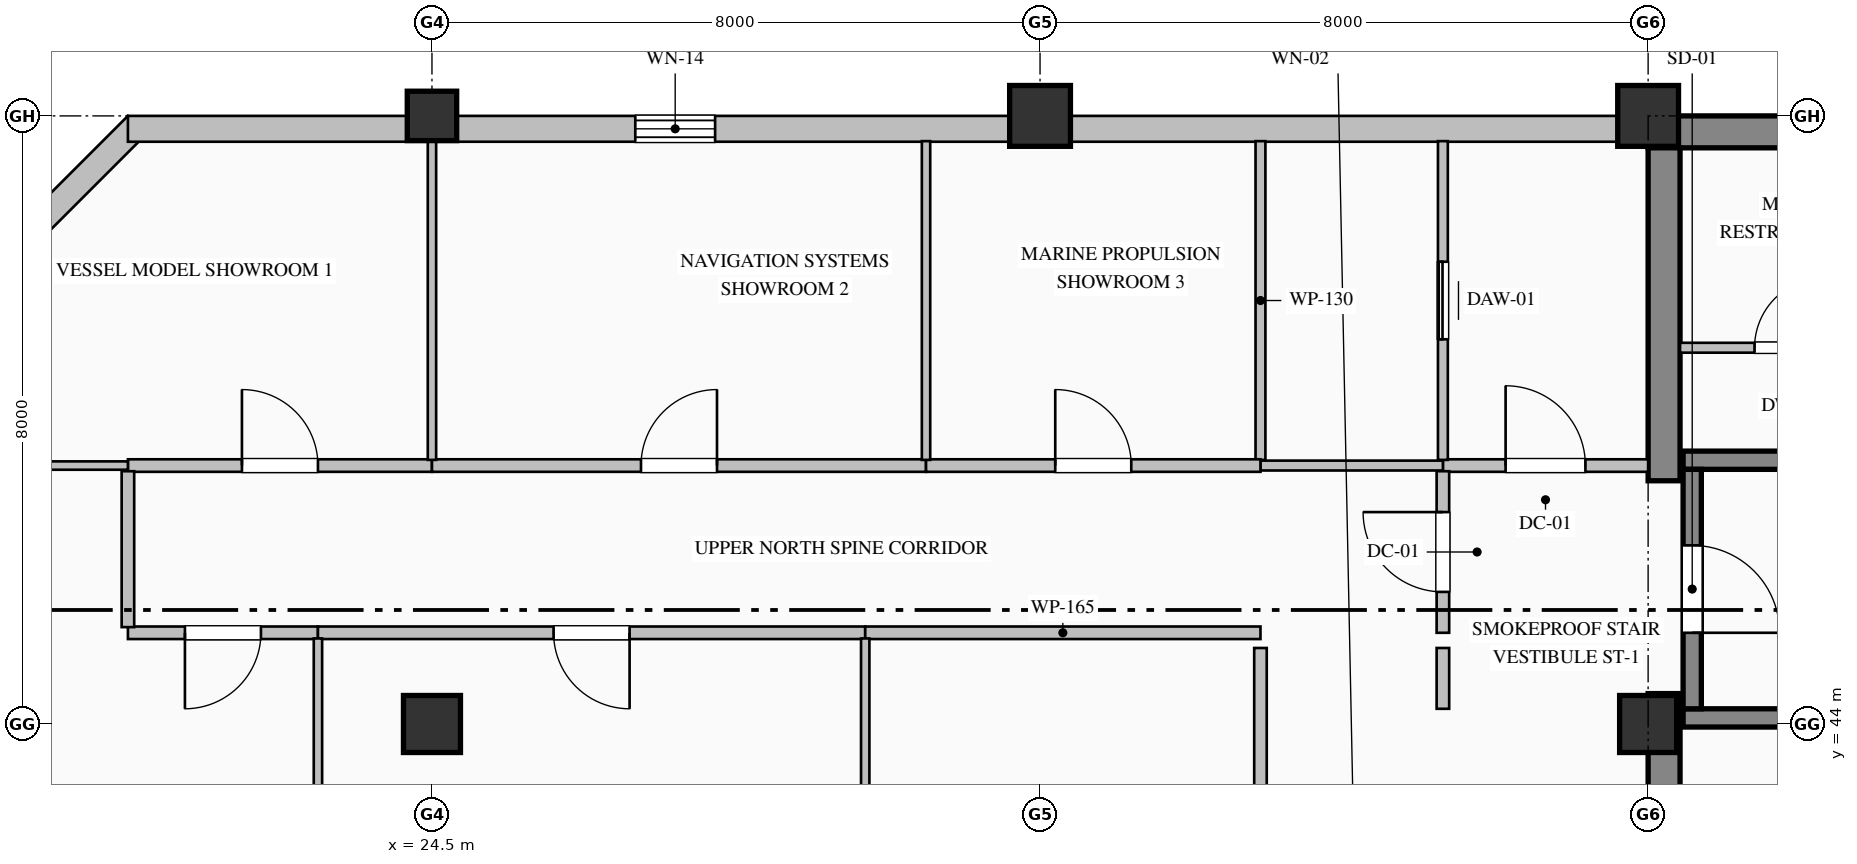
"""IFC4 building model, lengths in metres.
Left out: names, types, materials, properties, quantities, classifications, styles, units other than length and angle.
Written with IfcOpenShell. Run it as: python <this file> out.ifc"""

import sys

from ifc_helpers import new_model, si_unit, direction, frame, frame_2d, origin, origin_2d, place, context, subcontext, project, spatial, rectangle, hollow_rectangle, extrude, element, fill, save


model = new_model("IFC4")
c1 = context("Model", 3, precision=1e-05, world=origin(), true_north=direction((0.0, 1.0)))
c2 = subcontext(c1, "Body", "Model", "MODEL_VIEW")
j1 = project(units=[si_unit("LENGTHUNIT", "METRE"), si_unit("PLANEANGLEUNIT", "RADIAN")], contexts=[c1])
p1 = place(None, origin())
s1 = spatial("IfcSite", under=j1, at=p1, CompositionType="ELEMENT")
p2 = place(p1, origin())
s2 = spatial("IfcBuilding", under=s1, at=p2, CompositionType="ELEMENT")
p3 = place(p2, frame((0.0, 0.0, 351.2)))
s3 = spatial("IfcBuildingStorey", under=s2, at=p3, CompositionType="ELEMENT", Elevation=351.2)
p4 = place(p3, frame((40.5, 51.79, 0.0), z_axis=(0.0, 0.0, 1.0), x_axis=(1.0, 0.0, 0.0)))
e1 = element("IfcWall", 1, at=p4, inside=s3, PredefinedType="SHEAR", context=c2, shape_type="SweptSolid", body=[
    extrude(rectangle(XDim=23.5, YDim=0.42, at=frame_2d((11.75, 0.0))), origin(), (0.0, 0.0, 1.0), 3.785),
])
p5 = place(p3, frame((40.71, 36.42, 0.0), z_axis=(0.0, 0.0, 1.0), x_axis=(0.0, 1.0, 0.0)))
e2 = element("IfcWall", 2, at=p5, inside=s3, PredefinedType="SHEAR", context=c2, shape_type="SweptSolid", body=[
    extrude(rectangle(XDim=7.98, YDim=0.42, at=frame_2d((3.99, 0.0))), origin(), (0.0, 0.0, 1.0), 3.785),
])
p6 = place(p3, frame((40.71, 47.2, 0.0), z_axis=(0.0, 0.0, 1.0), x_axis=(0.0, 1.0, 0.0)))
e3 = element("IfcWall", 3, at=p6, inside=s3, PredefinedType="SHEAR", context=c2, shape_type="SweptSolid", body=[
    extrude(rectangle(XDim=4.38, YDim=0.42, at=frame_2d((2.19, 0.0))), origin(), (0.0, 0.0, 1.0), 3.785),
])
p7 = place(p3, frame((24.5, 44.0, 0.0), z_axis=(0.0, 0.0, 1.0), x_axis=(1.0, 0.0, 0.0)))
e4 = element("IfcColumn", 4, at=p7, inside=s3, PredefinedType="COLUMN", context=c2, shape_type="SweptSolid", body=[
    extrude(rectangle(XDim=0.75, YDim=0.75, at=origin_2d()), origin(), (0.0, 0.0, 1.0), 4.0),
])
p8 = place(p3, frame((24.5, 52.0, 0.0), z_axis=(0.0, 0.0, 1.0), x_axis=(1.0, 0.0, 0.0)))
e5 = element("IfcColumn", 5, at=p8, inside=s3, PredefinedType="COLUMN", context=c2, shape_type="SweptSolid", body=[
    extrude(hollow_rectangle(XDim=0.65, YDim=0.65, WallThickness=0.028, at=origin_2d()), origin(), (0.0, 0.0, 1.0), 4.0),
])
p9 = place(p3, frame((32.5, 52.0, 0.0), z_axis=(0.0, 0.0, 1.0), x_axis=(1.0, 0.0, 0.0)))
e6 = element("IfcColumn", 6, at=p9, inside=s3, PredefinedType="COLUMN", context=c2, shape_type="SweptSolid", body=[
    extrude(hollow_rectangle(XDim=0.8, YDim=0.8, WallThickness=0.032, at=origin_2d()), origin(), (0.0, 0.0, 1.0), 4.0),
])
p10 = place(p3, frame((40.5, 44.0, 0.0), z_axis=(0.0, 0.0, 1.0), x_axis=(1.0, 0.0, 0.0)))
e7 = element("IfcColumn", 7, at=p10, inside=s3, PredefinedType="COLUMN", context=c2, shape_type="SweptSolid", body=[
    extrude(rectangle(XDim=0.75, YDim=0.75, at=origin_2d()), origin(), (0.0, 0.0, 1.0), 4.0),
])
p11 = place(p3, frame((40.5, 52.0, 0.0), z_axis=(0.0, 0.0, 1.0), x_axis=(1.0, 0.0, 0.0)))
e8 = element("IfcColumn", 8, at=p11, inside=s3, PredefinedType="COLUMN", context=c2, shape_type="SweptSolid", body=[
    extrude(hollow_rectangle(XDim=0.8, YDim=0.8, WallThickness=0.032, at=origin_2d()), origin(), (0.0, 0.0, 1.0), 4.0),
])
p12 = place(p3, frame((16.62, 47.88, 0.0), z_axis=(0.0, 0.0, 1.0), x_axis=(0.707106781187, 0.707106781187, 0.0)))
e9 = element("IfcWall", 9, at=p12, inside=s3, PredefinedType="SOLIDWALL", context=c2, shape_type="SweptSolid", body=[
    extrude(rectangle(XDim=5.657, YDim=0.34, at=frame_2d((2.828, 0.0))), origin(), (0.0, 0.0, 1.0), 3.785),
])
p13 = place(p3, frame((20.5, 51.83, 0.0), z_axis=(0.0, 0.0, 1.0), x_axis=(1.0, 0.0, 0.0)))
e10 = element("IfcWall", 10, at=p13, inside=s3, PredefinedType="SOLIDWALL", context=c2, shape_type="SweptSolid", body=[
    extrude(rectangle(XDim=20.02, YDim=0.34, at=frame_2d((10.01, 0.0))), origin(), (0.0, 0.0, 1.0), 3.335),
])
p14 = place(p13, frame((6.675, 0.0, 0.8)))
e11 = element("IfcOpeningElement", 11, at=p14, cuts=e10, PredefinedType="OPENING", context=c2, shape_type="SweptSolid", body=[
    extrude(rectangle(XDim=1.05, YDim=2.15, at=frame_2d((0.525, 1.075))), frame((0.0, 0.18, 0.0), z_axis=(0.0, -1.0, 0.0), x_axis=(1.0, 0.0, 0.0)), (0.0, 0.0, 1.0), 0.36),
])
for number, where, z_axis, x_axis in (
    (12, (40.96, 47.47, 0.0), (0.0, 0.0, 1.0), (1.0, 0.0, 0.0)),
    (13, (49.04, 44.08, 0.0), (0.0, 0.0, 1.0), (-1.0, 0.0, 0.0)),
):
    element("IfcWall", number, at=place(p3, frame(where, z_axis=z_axis, x_axis=x_axis)), inside=s3, PredefinedType="SOLIDWALL", context=c2, shape_type="SweptSolid", body=[
        extrude(rectangle(XDim=8.08, YDim=0.24, at=frame_2d((4.04, 0.0))), origin(), (0.0, 0.0, 1.0), 4.0),
    ])
p15 = place(p3, frame((41.08, 47.35, 0.0), z_axis=(0.0, 0.0, 1.0), x_axis=(0.0, -1.0, 0.0)))
e14 = element("IfcWall", 14, at=p15, inside=s3, PredefinedType="SOLIDWALL", context=c2, shape_type="SweptSolid", body=[
    extrude(rectangle(XDim=3.15, YDim=0.24, at=frame_2d((1.575, 0.0))), origin(), (0.0, 0.0, 1.0), 4.0),
])
p16 = place(p15, frame((1.0, 0.0, 0.0)))
e15 = element("IfcOpeningElement", 15, at=p16, cuts=e14, PredefinedType="OPENING", context=c2, shape_type="SweptSolid", body=[
    extrude(rectangle(XDim=1.15, YDim=2.2, at=frame_2d((0.575, 1.1))), frame((0.0, 0.13, 0.0), z_axis=(0.0, -1.0, 0.0), x_axis=(1.0, 0.0, 0.0)), (0.0, 0.0, 1.0), 0.26),
])
p17 = place(p3, frame((37.8, 47.4, 0.0), z_axis=(0.0, 0.0, 1.0), x_axis=(1.0, 0.0, 0.0)))
e16 = element("IfcWall", 16, at=p17, inside=s3, PredefinedType="PARTITIONING", context=c2, shape_type="SweptSolid", body=[
    extrude(rectangle(XDim=2.7, YDim=0.165, at=frame_2d((1.35, 0.0))), origin(), (0.0, 0.0, 1.0), 3.785),
])
p18 = place(p17, frame((0.825, 0.0, 0.0)))
e17 = element("IfcOpeningElement", 17, at=p18, cuts=e16, PredefinedType="OPENING", context=c2, shape_type="SweptSolid", body=[
    extrude(rectangle(XDim=1.05, YDim=2.15, at=frame_2d((0.525, 1.075))), frame((0.0, 0.093, 0.0), z_axis=(0.0, -1.0, 0.0), x_axis=(1.0, 0.0, 0.0)), (0.0, 0.0, 1.0), 0.185),
])
p19 = place(p3, frame((37.8, 45.2, 0.0), z_axis=(0.0, 0.0, 1.0), x_axis=(0.0, 1.0, 0.0)))
e18 = element("IfcWall", 18, at=p19, inside=s3, PredefinedType="PARTITIONING", context=c2, shape_type="SweptSolid", body=[
    extrude(rectangle(XDim=2.125, YDim=0.165, at=frame_2d((1.063, 0.0))), origin(), (0.0, 0.0, 1.0), 3.785),
])
p20 = place(p19, frame((0.538, 0.0, 0.0)))
e19 = element("IfcOpeningElement", 19, at=p20, cuts=e18, PredefinedType="OPENING", context=c2, shape_type="SweptSolid", body=[
    extrude(rectangle(XDim=1.05, YDim=2.15, at=frame_2d((0.525, 1.075))), frame((0.0, 0.093, 0.0), z_axis=(0.0, -1.0, 0.0), x_axis=(1.0, 0.0, 0.0)), (0.0, 0.0, 1.0), 0.185),
])
p21 = place(p3, frame((37.8, 44.2, 0.0), z_axis=(0.0, 0.0, 1.0), x_axis=(0.0, 1.0, 0.0)))
e20 = element("IfcWall", 20, at=p21, inside=s3, PredefinedType="PARTITIONING", context=c2, shape_type="SweptSolid", body=[
    extrude(rectangle(XDim=0.8, YDim=0.165, at=frame_2d((0.4, 0.0))), origin(), (0.0, 0.0, 1.0), 3.785),
])
p22 = place(p3, frame((37.8, 47.475, 0.0), z_axis=(0.0, 0.0, 1.0), x_axis=(0.0, 1.0, 0.0)))
e21 = element("IfcWall", 21, at=p22, inside=s3, PredefinedType="PARTITIONING", context=c2, shape_type="SweptSolid", body=[
    extrude(rectangle(XDim=4.193, YDim=0.13, at=frame_2d((2.097, 0.0))), origin(), (0.0, 0.0, 1.0), 3.785),
])
p23 = place(p22, frame((1.587, 0.0, 0.0)))
e22 = element("IfcOpeningElement", 22, at=p23, cuts=e21, PredefinedType="OPENING", context=c2, shape_type="SweptSolid", body=[
    extrude(rectangle(XDim=1.02, YDim=2.15, at=frame_2d((0.51, 1.075))), frame((0.0, 0.075, 0.0), z_axis=(0.0, -1.0, 0.0), x_axis=(1.0, 0.0, 0.0)), (0.0, 0.0, 1.0), 0.15),
])
p24 = place(p3, frame((37.8, 47.4, 0.0), z_axis=(0.0, 0.0, 1.0), x_axis=(-1.0, 0.0, 0.0)))
e23 = element("IfcWall", 23, at=p24, inside=s3, PredefinedType="PARTITIONING", context=c2, shape_type="SweptSolid", body=[
    extrude(rectangle(XDim=2.4, YDim=0.13, at=frame_2d((1.2, 0.0))), origin(), (0.0, 0.0, 1.0), 3.785),
])
p25 = place(p3, frame((35.4, 47.475, 0.0), z_axis=(0.0, 0.0, 1.0), x_axis=(0.0, 1.0, 0.0)))
e24 = element("IfcWall", 24, at=p25, inside=s3, PredefinedType="PARTITIONING", context=c2, shape_type="SweptSolid", body=[
    extrude(rectangle(XDim=4.193, YDim=0.13, at=frame_2d((2.097, 0.0))), origin(), (0.0, 0.0, 1.0), 3.785),
])
p26 = place(p3, frame((40.92, 48.95, 0.0), z_axis=(0.0, 0.0, 1.0), x_axis=(1.0, 0.0, 0.0)))
e25 = element("IfcWall", 25, at=p26, inside=s3, PredefinedType="PARTITIONING", context=c2, shape_type="SweptSolid", body=[
    extrude(rectangle(XDim=2.88, YDim=0.13, at=frame_2d((1.44, 0.0))), origin(), (0.0, 0.0, 1.0), 3.785),
])
p27 = place(p26, frame((0.98, 0.0, 0.0)))
e26 = element("IfcOpeningElement", 26, at=p27, cuts=e25, PredefinedType="OPENING", context=c2, shape_type="SweptSolid", body=[
    extrude(rectangle(XDim=0.92, YDim=2.15, at=frame_2d((0.46, 1.075))), frame((0.0, 0.075, 0.0), z_axis=(0.0, -1.0, 0.0), x_axis=(1.0, 0.0, 0.0)), (0.0, 0.0, 1.0), 0.15),
])
p28 = place(p3, frame((20.5, 47.4, 0.0), z_axis=(0.0, 0.0, 1.0), x_axis=(1.0, 0.0, 0.0)))
e27 = element("IfcWall", 27, at=p28, inside=s3, PredefinedType="PARTITIONING", context=c2, shape_type="SweptSolid", body=[
    extrude(rectangle(XDim=4.0, YDim=0.165, at=frame_2d((2.0, 0.0))), origin(), (0.0, 0.0, 1.0), 3.785),
])
p29 = place(p28, frame((1.5, 0.0, 0.0)))
e28 = element("IfcOpeningElement", 28, at=p29, cuts=e27, PredefinedType="OPENING", context=c2, shape_type="SweptSolid", body=[
    extrude(rectangle(XDim=1.0, YDim=2.15, at=frame_2d((0.5, 1.075))), frame((0.0, 0.093, 0.0), z_axis=(0.0, -1.0, 0.0), x_axis=(1.0, 0.0, 0.0)), (0.0, 0.0, 1.0), 0.185),
])
p30 = place(p3, frame((24.5, 47.4, 0.0), z_axis=(0.0, 0.0, 1.0), x_axis=(1.0, 0.0, 0.0)))
e29 = element("IfcWall", 29, at=p30, inside=s3, PredefinedType="PARTITIONING", context=c2, shape_type="SweptSolid", body=[
    extrude(rectangle(XDim=6.5, YDim=0.165, at=frame_2d((3.25, 0.0))), origin(), (0.0, 0.0, 1.0), 3.785),
])
p31 = place(p30, frame((2.75, 0.0, 0.0)))
e30 = element("IfcOpeningElement", 30, at=p31, cuts=e29, PredefinedType="OPENING", context=c2, shape_type="SweptSolid", body=[
    extrude(rectangle(XDim=1.0, YDim=2.15, at=frame_2d((0.5, 1.075))), frame((0.0, 0.093, 0.0), z_axis=(0.0, -1.0, 0.0), x_axis=(1.0, 0.0, 0.0)), (0.0, 0.0, 1.0), 0.185),
])
p32 = place(p3, frame((31.0, 47.4, 0.0), z_axis=(0.0, 0.0, 1.0), x_axis=(1.0, 0.0, 0.0)))
e31 = element("IfcWall", 31, at=p32, inside=s3, PredefinedType="PARTITIONING", context=c2, shape_type="SweptSolid", body=[
    extrude(rectangle(XDim=4.4, YDim=0.165, at=frame_2d((2.2, 0.0))), origin(), (0.0, 0.0, 1.0), 3.785),
])
p33 = place(p32, frame((1.7, 0.0, 0.0)))
e32 = element("IfcOpeningElement", 32, at=p33, cuts=e31, PredefinedType="OPENING", context=c2, shape_type="SweptSolid", body=[
    extrude(rectangle(XDim=1.0, YDim=2.15, at=frame_2d((0.5, 1.075))), frame((0.0, 0.093, 0.0), z_axis=(0.0, -1.0, 0.0), x_axis=(1.0, 0.0, 0.0)), (0.0, 0.0, 1.0), 0.185),
])
p34 = place(p3, frame((23.0, 45.2, 0.0), z_axis=(0.0, 0.0, 1.0), x_axis=(-1.0, 0.0, 0.0)))
e33 = element("IfcWall", 33, at=p34, inside=s3, PredefinedType="PARTITIONING", context=c2, shape_type="SweptSolid", body=[
    extrude(rectangle(XDim=2.5, YDim=0.165, at=frame_2d((1.25, 0.0))), origin(), (0.0, 0.0, 1.0), 3.785),
])
p35 = place(p34, frame((0.75, 0.0, 0.0)))
e34 = element("IfcOpeningElement", 34, at=p35, cuts=e33, PredefinedType="OPENING", context=c2, shape_type="SweptSolid", body=[
    extrude(rectangle(XDim=1.0, YDim=2.15, at=frame_2d((0.5, 1.075))), frame((0.0, 0.093, 0.0), z_axis=(0.0, -1.0, 0.0), x_axis=(1.0, 0.0, 0.0)), (0.0, 0.0, 1.0), 0.185),
])
p36 = place(p3, frame((20.5, 45.274, 0.0), z_axis=(0.0, 0.0, 1.0), x_axis=(0.0, 1.0, 0.0)))
e35 = element("IfcWall", 35, at=p36, inside=s3, PredefinedType="PARTITIONING", context=c2, shape_type="SweptSolid", body=[
    extrude(rectangle(XDim=2.051, YDim=0.165, at=frame_2d((1.025, 0.0))), origin(), (0.0, 0.0, 1.0), 3.785),
])
p37 = place(p3, frame((30.2, 45.2, 0.0), z_axis=(0.0, 0.0, 1.0), x_axis=(-1.0, 0.0, 0.0)))
e36 = element("IfcWall", 36, at=p37, inside=s3, PredefinedType="PARTITIONING", context=c2, shape_type="SweptSolid", body=[
    extrude(rectangle(XDim=7.2, YDim=0.165, at=frame_2d((3.6, 0.0))), origin(), (0.0, 0.0, 1.0), 3.785),
])
p38 = place(p37, frame((3.1, 0.0, 0.0)))
e37 = element("IfcOpeningElement", 37, at=p38, cuts=e36, PredefinedType="OPENING", context=c2, shape_type="SweptSolid", body=[
    extrude(rectangle(XDim=1.0, YDim=2.15, at=frame_2d((0.5, 1.075))), frame((0.0, 0.093, 0.0), z_axis=(0.0, -1.0, 0.0), x_axis=(1.0, 0.0, 0.0)), (0.0, 0.0, 1.0), 0.185),
])
p39 = place(p3, frame((35.4, 45.2, 0.0), z_axis=(0.0, 0.0, 1.0), x_axis=(-1.0, 0.0, 0.0)))
e38 = element("IfcWall", 38, at=p39, inside=s3, PredefinedType="PARTITIONING", context=c2, shape_type="SweptSolid", body=[
    extrude(rectangle(XDim=5.2, YDim=0.165, at=frame_2d((2.6, 0.0))), origin(), (0.0, 0.0, 1.0), 3.785),
])
p40 = place(p3, frame((35.4, 33.6, 0.0), z_axis=(0.0, 0.0, 1.0), x_axis=(0.0, 1.0, 0.0)))
e39 = element("IfcWall", 39, at=p40, inside=s3, PredefinedType="PARTITIONING", context=c2, shape_type="SweptSolid", body=[
    extrude(rectangle(XDim=11.4, YDim=0.165, at=frame_2d((5.7, 0.0))), origin(), (0.0, 0.0, 1.0), 3.785),
])
p41 = place(p40, frame((5.2, 0.0, 0.0)))
e40 = element("IfcOpeningElement", 40, at=p41, cuts=e39, PredefinedType="OPENING", context=c2, shape_type="SweptSolid", body=[
    extrude(rectangle(XDim=1.0, YDim=2.15, at=frame_2d((0.5, 1.075))), frame((0.0, 0.093, 0.0), z_axis=(0.0, -1.0, 0.0), x_axis=(1.0, 0.0, 0.0)), (0.0, 0.0, 1.0), 0.185),
])
p42 = place(p3, frame((24.5, 51.668, 0.0), z_axis=(0.0, 0.0, 1.0), x_axis=(0.0, -1.0, 0.0)))
e41 = element("IfcWall", 41, at=p42, inside=s3, PredefinedType="MOVABLE", context=c2, shape_type="SweptSolid", body=[
    extrude(rectangle(XDim=4.193, YDim=0.11, at=frame_2d((2.097, 0.0))), origin(), (0.0, 0.0, 1.0), 3.177),
])
p43 = place(p3, frame((20.5, 47.4, 0.0), z_axis=(0.0, 0.0, 1.0), x_axis=(-1.0, 0.0, 0.0)))
e42 = element("IfcWall", 42, at=p43, inside=s3, PredefinedType="MOVABLE", context=c2, shape_type="SweptSolid", body=[
    extrude(rectangle(XDim=3.668, YDim=0.11, at=frame_2d((1.834, 0.0))), origin(), (0.0, 0.0, 1.0), 3.785),
])
p44 = place(p3, frame((31.0, 51.668, 0.0), z_axis=(0.0, 0.0, 1.0), x_axis=(0.0, -1.0, 0.0)))
e43 = element("IfcWall", 43, at=p44, inside=s3, PredefinedType="MOVABLE", context=c2, shape_type="SweptSolid", body=[
    extrude(rectangle(XDim=4.193, YDim=0.11, at=frame_2d((2.097, 0.0))), origin(), (0.0, 0.0, 1.0), 3.785),
])
for number, where, z_axis, x_axis in (
    (44, (23.0, 45.125, 0.0), (0.0, 0.0, 1.0), (0.0, -1.0, 0.0)),
    (45, (30.2, 45.125, 0.0), (0.0, 0.0, 1.0), (0.0, -1.0, 0.0)),
):
    element("IfcWall", number, at=place(p3, frame(where, z_axis=z_axis, x_axis=x_axis)), inside=s3, PredefinedType="MOVABLE", context=c2, shape_type="SweptSolid", body=[
        extrude(rectangle(XDim=16.793, YDim=0.11, at=frame_2d((8.397, 0.0))), origin(), (0.0, 0.0, 1.0), 3.785),
    ])
p45 = place(p14, origin())
e46 = element("IfcWindow", 46, at=p45, inside=s3, PartitioningType="SINGLE_PANEL", PredefinedType="WINDOW", context=c2, shape_type="SweptSolid", body=[
    extrude(rectangle(XDim=1.05, YDim=2.15, at=frame_2d((0.525, 1.075))), frame((0.0, 0.15, 0.0), z_axis=(0.0, -1.0, 0.0), x_axis=(1.0, 0.0, 0.0)), (0.0, 0.0, 1.0), 0.06),
])
fill(e11, e46)
p46 = place(p16, origin())
e47 = element("IfcDoor", 47, at=p46, inside=s3, OperationType="SINGLE_SWING_RIGHT", PredefinedType="DOOR", context=c2, shape_type="SweptSolid", body=[
    extrude(rectangle(XDim=1.15, YDim=2.2, at=frame_2d((0.575, 1.1))), frame((0.0, 0.025, 0.0), z_axis=(0.0, -1.0, 0.0), x_axis=(1.0, 0.0, 0.0)), (0.0, 0.0, 1.0), 0.05),
])
fill(e15, e47)
p47 = place(p18, origin())
e48 = element("IfcDoor", 48, at=p47, inside=s3, OperationType="SINGLE_SWING_LEFT", PredefinedType="DOOR", context=c2, shape_type="SweptSolid", body=[
    extrude(rectangle(XDim=1.05, YDim=2.15, at=frame_2d((0.525, 1.075))), frame((0.0, 0.025, 0.0), z_axis=(0.0, -1.0, 0.0), x_axis=(1.0, 0.0, 0.0)), (0.0, 0.0, 1.0), 0.05),
])
fill(e17, e48)
p48 = place(p20, origin())
e49 = element("IfcDoor", 49, at=p48, inside=s3, OperationType="SINGLE_SWING_RIGHT", PredefinedType="DOOR", context=c2, shape_type="SweptSolid", body=[
    extrude(rectangle(XDim=1.05, YDim=2.15, at=frame_2d((0.525, 1.075))), frame((0.0, 0.025, 0.0), z_axis=(0.0, -1.0, 0.0), x_axis=(1.0, 0.0, 0.0)), (0.0, 0.0, 1.0), 0.05),
])
fill(e19, e49)
p49 = place(p23, origin())
e50 = element("IfcDoor", 50, at=p49, inside=s3, OperationType="SLIDING_TO_LEFT", PredefinedType="DOOR", context=c2, shape_type="SweptSolid", body=[
    extrude(rectangle(XDim=1.02, YDim=2.15, at=frame_2d((0.51, 1.075))), frame((0.0, 0.025, 0.0), z_axis=(0.0, -1.0, 0.0), x_axis=(1.0, 0.0, 0.0)), (0.0, 0.0, 1.0), 0.05),
])
fill(e22, e50)
p50 = place(p27, origin())
e51 = element("IfcDoor", 51, at=p50, inside=s3, OperationType="SINGLE_SWING_RIGHT", PredefinedType="DOOR", context=c2, shape_type="SweptSolid", body=[
    extrude(rectangle(XDim=0.92, YDim=2.15, at=frame_2d((0.46, 1.075))), frame((0.0, 0.025, 0.0), z_axis=(0.0, -1.0, 0.0), x_axis=(1.0, 0.0, 0.0)), (0.0, 0.0, 1.0), 0.05),
])
fill(e26, e51)
p51 = place(p29, origin())
e52 = element("IfcDoor", 52, at=p51, inside=s3, OperationType="SINGLE_SWING_LEFT", PredefinedType="DOOR", context=c2, shape_type="SweptSolid", body=[
    extrude(rectangle(XDim=1.0, YDim=2.15, at=frame_2d((0.5, 1.075))), frame((0.0, 0.025, 0.0), z_axis=(0.0, -1.0, 0.0), x_axis=(1.0, 0.0, 0.0)), (0.0, 0.0, 1.0), 0.05),
])
fill(e28, e52)
p52 = place(p31, origin())
e53 = element("IfcDoor", 53, at=p52, inside=s3, OperationType="SINGLE_SWING_RIGHT", PredefinedType="DOOR", context=c2, shape_type="SweptSolid", body=[
    extrude(rectangle(XDim=1.0, YDim=2.15, at=frame_2d((0.5, 1.075))), frame((0.0, 0.025, 0.0), z_axis=(0.0, -1.0, 0.0), x_axis=(1.0, 0.0, 0.0)), (0.0, 0.0, 1.0), 0.05),
])
fill(e30, e53)
p53 = place(p33, origin())
e54 = element("IfcDoor", 54, at=p53, inside=s3, OperationType="SINGLE_SWING_LEFT", PredefinedType="DOOR", context=c2, shape_type="SweptSolid", body=[
    extrude(rectangle(XDim=1.0, YDim=2.15, at=frame_2d((0.5, 1.075))), frame((0.0, 0.025, 0.0), z_axis=(0.0, -1.0, 0.0), x_axis=(1.0, 0.0, 0.0)), (0.0, 0.0, 1.0), 0.05),
])
fill(e32, e54)
p54 = place(p35, origin())
e55 = element("IfcDoor", 55, at=p54, inside=s3, OperationType="SINGLE_SWING_RIGHT", PredefinedType="DOOR", context=c2, shape_type="SweptSolid", body=[
    extrude(rectangle(XDim=1.0, YDim=2.15, at=frame_2d((0.5, 1.075))), frame((0.0, 0.025, 0.0), z_axis=(0.0, -1.0, 0.0), x_axis=(1.0, 0.0, 0.0)), (0.0, 0.0, 1.0), 0.05),
])
fill(e34, e55)
p55 = place(p38, origin())
e56 = element("IfcDoor", 56, at=p55, inside=s3, OperationType="SINGLE_SWING_LEFT", PredefinedType="DOOR", context=c2, shape_type="SweptSolid", body=[
    extrude(rectangle(XDim=1.0, YDim=2.15, at=frame_2d((0.5, 1.075))), frame((0.0, 0.025, 0.0), z_axis=(0.0, -1.0, 0.0), x_axis=(1.0, 0.0, 0.0)), (0.0, 0.0, 1.0), 0.05),
])
fill(e37, e56)
save(model, sys.argv[1])
